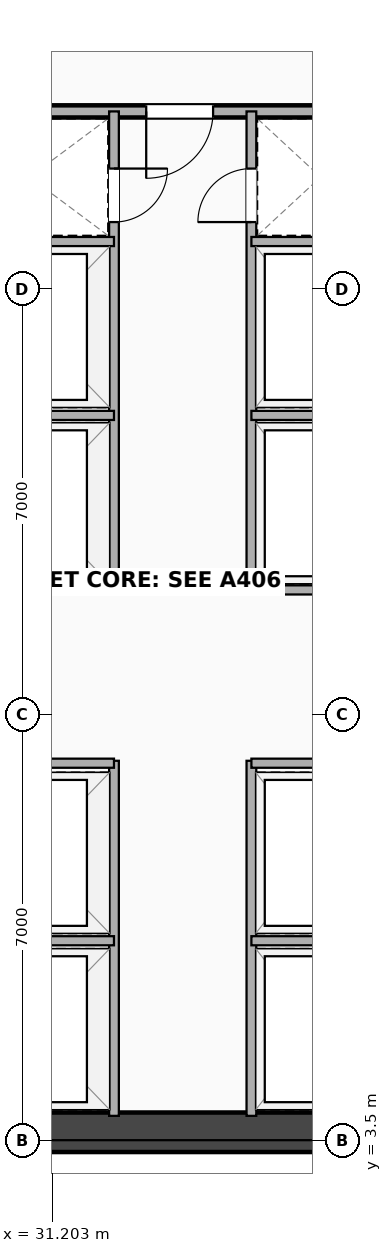
"""IFC4 building model, lengths in metres.
Left out: names, types, materials, properties, quantities, classifications, styles, units other than length and angle.
Written with IfcOpenShell. Run it as: python <this file> out.ifc"""

import sys

from ifc_helpers import new_model, si_unit, direction, frame, frame_2d, origin, place, context, subcontext, project, spatial, rectangle, extrude, element, fill, save


model = new_model("IFC4")
c1 = context("Model", 3, precision=1e-05, world=origin(), true_north=direction((0.0, 1.0)))
c2 = subcontext(c1, "Body", "Model", "MODEL_VIEW")
j1 = project(units=[si_unit("LENGTHUNIT", "METRE"), si_unit("PLANEANGLEUNIT", "RADIAN")], contexts=[c1])
p1 = place(None, origin())
s1 = spatial("IfcSite", under=j1, at=p1, CompositionType="ELEMENT")
p2 = place(p1, origin())
s2 = spatial("IfcBuilding", under=s1, at=p2, CompositionType="ELEMENT")
p3 = place(p2, frame((0.0, 0.0, 75.4)))
s3 = spatial("IfcBuildingStorey", under=s2, at=p3, CompositionType="ELEMENT", Elevation=75.4)
p4 = place(p3, frame((20.3, 3.63, 0.0), z_axis=(0.0, 0.0, 1.0), x_axis=(1.0, 0.0, 0.0)))
e1 = element("IfcWall", 1, at=p4, inside=s3, PredefinedType="SHEAR", context=c2, shape_type="SweptSolid", body=[
    extrude(rectangle(XDim=24.5, YDim=0.65, at=frame_2d((12.25, 0.0))), origin(), (0.0, 0.0, 1.0), 8.14),
])
p5 = place(p3, frame((29.2, 20.42, 0.0), z_axis=(0.0, 0.0, 1.0), x_axis=(1.0, 0.0, 0.0)))
e2 = element("IfcWall", 2, at=p5, inside=s3, PredefinedType="PARTITIONING", context=c2, shape_type="SweptSolid", body=[
    extrude(rectangle(XDim=7.8, YDim=0.2, at=frame_2d((3.9, 0.0))), origin(), (0.0, 0.0, 1.0), 7.43),
])
p6 = place(p5, frame((3.55, 0.0, 0.0)))
e3 = element("IfcOpeningElement", 3, at=p6, cuts=e2, PredefinedType="OPENING", context=c2, shape_type="SweptSolid", body=[
    extrude(rectangle(XDim=1.1, YDim=2.15, at=frame_2d((0.55, 1.075))), frame((0.0, 0.11, 0.0), z_axis=(0.0, -1.0, 0.0), x_axis=(1.0, 0.0, 0.0)), (0.0, 0.0, 1.0), 0.22),
])
for number, where, z_axis, x_axis in (
    (4, (32.22, 3.9, 0.0), (0.0, 0.0, 1.0), (0.0, 1.0, 0.0)),
    (5, (34.48, 3.9, 0.0), (0.0, 0.0, 1.0), (0.0, 1.0, 0.0)),
):
    element("IfcWall", number, at=place(p3, frame(where, z_axis=z_axis, x_axis=x_axis)), inside=s3, PredefinedType="PARTITIONING", context=c2, shape_type="SweptSolid", body=[
        extrude(rectangle(XDim=5.84, YDim=0.16, at=frame_2d((2.92, 0.0))), origin(), (0.0, 0.0, 1.0), 8.14),
    ])
p7 = place(p3, frame((29.45, 6.78, 0.0), z_axis=(0.0, 0.0, 1.0), x_axis=(1.0, 0.0, 0.0)))
e6 = element("IfcWall", 6, at=p7, inside=s3, PredefinedType="PARTITIONING", context=c2, shape_type="SweptSolid", body=[
    extrude(rectangle(XDim=2.77, YDim=0.15, at=frame_2d((1.385, 0.0))), origin(), (0.0, 0.0, 1.0), 8.14),
])
p8 = place(p3, frame((34.48, 6.78, 0.0), z_axis=(0.0, 0.0, 1.0), x_axis=(1.0, 0.0, 0.0)))
e7 = element("IfcWall", 7, at=p8, inside=s3, PredefinedType="PARTITIONING", context=c2, shape_type="SweptSolid", body=[
    extrude(rectangle(XDim=2.27, YDim=0.15, at=frame_2d((1.135, 0.0))), origin(), (0.0, 0.0, 1.0), 8.14),
])
p9 = place(p3, frame((29.45, 9.7, 0.0), z_axis=(0.0, 0.0, 1.0), x_axis=(1.0, 0.0, 0.0)))
e8 = element("IfcWall", 8, at=p9, inside=s3, PredefinedType="PARTITIONING", context=c2, shape_type="SweptSolid", body=[
    extrude(rectangle(XDim=2.77, YDim=0.15, at=frame_2d((1.385, 0.0))), origin(), (0.0, 0.0, 1.0), 8.14),
])
p10 = place(p3, frame((34.48, 9.7, 0.0), z_axis=(0.0, 0.0, 1.0), x_axis=(1.0, 0.0, 0.0)))
e9 = element("IfcWall", 9, at=p10, inside=s3, PredefinedType="PARTITIONING", context=c2, shape_type="SweptSolid", body=[
    extrude(rectangle(XDim=2.27, YDim=0.15, at=frame_2d((1.135, 0.0))), origin(), (0.0, 0.0, 1.0), 8.14),
])
p11 = place(p3, frame((32.22, 12.5, 0.0), z_axis=(0.0, 0.0, 1.0), x_axis=(0.0, 1.0, 0.0)))
e10 = element("IfcWall", 10, at=p11, inside=s3, PredefinedType="PARTITIONING", context=c2, shape_type="SweptSolid", body=[
    extrude(rectangle(XDim=7.92, YDim=0.16, at=frame_2d((3.96, 0.0))), origin(), (0.0, 0.0, 1.0), 7.43),
])
p12 = place(p11, frame((6.1, 0.0, 0.0)))
e11 = element("IfcOpeningElement", 11, at=p12, cuts=e10, PredefinedType="OPENING", context=c2, shape_type="SweptSolid", body=[
    extrude(rectangle(XDim=0.88, YDim=2.08, at=frame_2d((0.44, 1.04))), frame((0.0, 0.09, 0.0), z_axis=(0.0, -1.0, 0.0), x_axis=(1.0, 0.0, 0.0)), (0.0, 0.0, 1.0), 0.18),
])
p13 = place(p3, frame((34.48, 12.5, 0.0), z_axis=(0.0, 0.0, 1.0), x_axis=(0.0, 1.0, 0.0)))
e12 = element("IfcWall", 12, at=p13, inside=s3, PredefinedType="PARTITIONING", context=c2, shape_type="SweptSolid", body=[
    extrude(rectangle(XDim=7.92, YDim=0.16, at=frame_2d((3.96, 0.0))), origin(), (0.0, 0.0, 1.0), 7.43),
])
p14 = place(p13, frame((6.98, 0.0, 0.0), z_axis=(0.0, 0.0, 1.0), x_axis=(-1.0, 0.0, 0.0)))
e13 = element("IfcOpeningElement", 13, at=p14, cuts=e12, PredefinedType="OPENING", context=c2, shape_type="SweptSolid", body=[
    extrude(rectangle(XDim=0.88, YDim=2.08, at=frame_2d((0.44, 1.04))), frame((0.0, 0.09, 0.0), z_axis=(0.0, -1.0, 0.0), x_axis=(1.0, 0.0, 0.0)), (0.0, 0.0, 1.0), 0.18),
])
p15 = place(p3, frame((29.45, 12.55, 0.0), z_axis=(0.0, 0.0, 1.0), x_axis=(1.0, 0.0, 0.0)))
e14 = element("IfcWall", 14, at=p15, inside=s3, PredefinedType="PARTITIONING", context=c2, shape_type="SweptSolid", body=[
    extrude(rectangle(XDim=2.77, YDim=0.15, at=frame_2d((1.385, 0.0))), origin(), (0.0, 0.0, 1.0), 8.14),
])
p16 = place(p3, frame((34.48, 12.55, 0.0), z_axis=(0.0, 0.0, 1.0), x_axis=(1.0, 0.0, 0.0)))
e15 = element("IfcWall", 15, at=p16, inside=s3, PredefinedType="PARTITIONING", context=c2, shape_type="SweptSolid", body=[
    extrude(rectangle(XDim=2.27, YDim=0.15, at=frame_2d((1.135, 0.0))), origin(), (0.0, 0.0, 1.0), 8.14),
])
p17 = place(p3, frame((29.45, 15.42, 0.0), z_axis=(0.0, 0.0, 1.0), x_axis=(1.0, 0.0, 0.0)))
e16 = element("IfcWall", 16, at=p17, inside=s3, PredefinedType="PARTITIONING", context=c2, shape_type="SweptSolid", body=[
    extrude(rectangle(XDim=2.77, YDim=0.15, at=frame_2d((1.385, 0.0))), origin(), (0.0, 0.0, 1.0), 8.14),
])
p18 = place(p3, frame((34.48, 15.42, 0.0), z_axis=(0.0, 0.0, 1.0), x_axis=(1.0, 0.0, 0.0)))
e17 = element("IfcWall", 17, at=p18, inside=s3, PredefinedType="PARTITIONING", context=c2, shape_type="SweptSolid", body=[
    extrude(rectangle(XDim=2.27, YDim=0.15, at=frame_2d((1.135, 0.0))), origin(), (0.0, 0.0, 1.0), 8.14),
])
p19 = place(p3, frame((29.45, 18.28, 0.0), z_axis=(0.0, 0.0, 1.0), x_axis=(1.0, 0.0, 0.0)))
e18 = element("IfcWall", 18, at=p19, inside=s3, PredefinedType="PARTITIONING", context=c2, shape_type="SweptSolid", body=[
    extrude(rectangle(XDim=2.77, YDim=0.15, at=frame_2d((1.385, 0.0))), origin(), (0.0, 0.0, 1.0), 8.14),
])
p20 = place(p3, frame((34.48, 18.28, 0.0), z_axis=(0.0, 0.0, 1.0), x_axis=(1.0, 0.0, 0.0)))
e19 = element("IfcWall", 19, at=p20, inside=s3, PredefinedType="PARTITIONING", context=c2, shape_type="SweptSolid", body=[
    extrude(rectangle(XDim=2.27, YDim=0.15, at=frame_2d((1.135, 0.0))), origin(), (0.0, 0.0, 1.0), 8.14),
])
p21 = place(p6, origin())
e20 = element("IfcDoor", 20, at=p21, inside=s3, OperationType="SINGLE_SWING_LEFT", PredefinedType="DOOR", context=c2, shape_type="SweptSolid", body=[
    extrude(rectangle(XDim=1.1, YDim=2.15, at=frame_2d((0.55, 1.075))), frame((0.0, 0.025, 0.0), z_axis=(0.0, -1.0, 0.0), x_axis=(1.0, 0.0, 0.0)), (0.0, 0.0, 1.0), 0.05),
])
fill(e3, e20)
p22 = place(p12, origin())
e21 = element("IfcDoor", 21, at=p22, inside=s3, OperationType="SINGLE_SWING_RIGHT", PredefinedType="DOOR", context=c2, shape_type="SweptSolid", body=[
    extrude(rectangle(XDim=0.88, YDim=2.08, at=frame_2d((0.44, 1.04))), frame((0.0, 0.025, 0.0), z_axis=(0.0, -1.0, 0.0), x_axis=(1.0, 0.0, 0.0)), (0.0, 0.0, 1.0), 0.05),
])
fill(e11, e21)
p23 = place(p14, origin())
e22 = element("IfcDoor", 22, at=p23, inside=s3, OperationType="SINGLE_SWING_LEFT", PredefinedType="DOOR", context=c2, shape_type="SweptSolid", body=[
    extrude(rectangle(XDim=0.88, YDim=2.08, at=frame_2d((0.44, 1.04))), frame((0.0, 0.025, 0.0), z_axis=(0.0, -1.0, 0.0), x_axis=(1.0, 0.0, 0.0)), (0.0, 0.0, 1.0), 0.05),
])
fill(e13, e22)
save(model, sys.argv[1])
